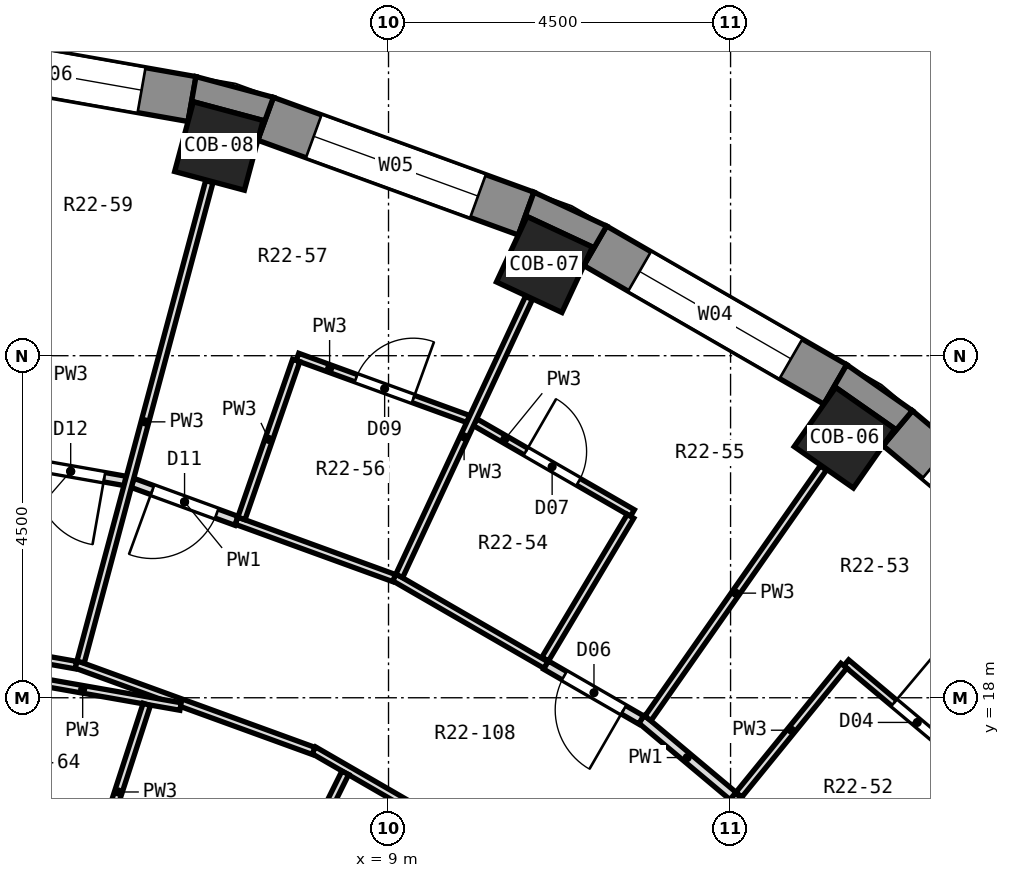
"""IFC4 building model, lengths in metres.
Left out: names, types, materials, properties, quantities, classifications, styles, units other than length and angle.
Written with IfcOpenShell. Run it as: python <this file> out.ifc"""

import sys

from ifc_helpers import new_model, si_unit, direction, frame, frame_2d, origin, origin_2d, place, context, subcontext, project, spatial, polyline, rectangle, outline, extrude, element, fill, save


model = new_model("IFC4")
c1 = context("Model", 3, precision=1e-05, world=origin(), true_north=direction((0.0, 1.0)))
c2 = subcontext(c1, "Body", "Model", "MODEL_VIEW")
j1 = project(units=[si_unit("LENGTHUNIT", "METRE"), si_unit("PLANEANGLEUNIT", "RADIAN")], contexts=[c1])
p1 = place(None, origin())
s1 = spatial("IfcSite", under=j1, at=p1, CompositionType="ELEMENT")
p2 = place(p1, origin())
s2 = spatial("IfcBuilding", under=s1, at=p2, CompositionType="ELEMENT")
p3 = place(p2, frame((0.0, 0.0, 141.4)))
s3 = spatial("IfcBuildingStorey", under=s2, at=p3, CompositionType="ELEMENT", Elevation=141.4)
for number, where, z_axis, x_axis in (
    (1, (14.999, 21.421, 0.0), (0.0, 0.0, 1.0), (0.574, 0.819, 0.0)),
    (2, (11.052, 23.7, 0.0), (0.0, 0.0, 1.0), (0.423, 0.906, 0.0)),
    (3, (6.768, 25.259, 0.0), (0.0, 0.0, 1.0), (0.259, 0.966, 0.0)),
):
    element("IfcColumn", number, at=place(p3, frame(where, z_axis=z_axis, x_axis=x_axis)), inside=s3, PredefinedType="COLUMN", context=c2, shape_type="SweptSolid", body=[
        extrude(rectangle(XDim=0.95, YDim=0.95, at=origin_2d()), origin(), (0.0, 0.0, 1.0), 3.3),
    ])
p4 = place(p3, frame((18.494, 19.202, 0.0), z_axis=(0.0, 0.0, 1.0), x_axis=(-0.766055462616, 0.642774476932, 0.0)))
e4 = element("IfcWall", 4, at=p4, inside=s3, PredefinedType="SOLIDWALL", context=c2, shape_type="SweptSolid", body=[
    extrude(rectangle(XDim=3.648, YDim=0.6, at=frame_2d((1.824, 0.0))), origin(), (0.0, 0.0, 1.0), 2.8),
])
p5 = place(p4, frame((0.674, 0.0, 0.9)))
e5 = element("IfcOpeningElement", 5, at=p5, cuts=e4, PredefinedType="OPENING", context=c2, shape_type="SweptSolid", body=[
    extrude(rectangle(XDim=2.3, YDim=1.8, at=frame_2d((1.15, 0.9))), frame((0.0, 0.312, 0.0), z_axis=(0.0, -1.0, 0.0), x_axis=(1.0, 0.0, 0.0)), (0.0, 0.0, 1.0), 0.624),
])
p6 = place(p3, frame((14.878, 22.122, 0.0), z_axis=(0.0, 0.0, 1.0), x_axis=(-0.866051847062, 0.499954196102, 0.0)))
e6 = element("IfcWall", 6, at=p6, inside=s3, PredefinedType="SOLIDWALL", context=c2, shape_type="SweptSolid", body=[
    extrude(rectangle(XDim=3.648, YDim=0.6, at=frame_2d((1.824, 0.0))), origin(), (0.0, 0.0, 1.0), 2.8),
])
p7 = place(p6, frame((0.674, 0.0, 0.9)))
e7 = element("IfcOpeningElement", 7, at=p7, cuts=e6, PredefinedType="OPENING", context=c2, shape_type="SweptSolid", body=[
    extrude(rectangle(XDim=2.3, YDim=1.8, at=frame_2d((1.15, 0.9))), frame((0.0, 0.312, 0.0), z_axis=(0.0, -1.0, 0.0), x_axis=(1.0, 0.0, 0.0)), (0.0, 0.0, 1.0), 0.624),
])
p8 = place(p3, frame((10.811, 24.369, 0.0), z_axis=(0.0, 0.0, 1.0), x_axis=(-0.939703505393, 0.341990236633, 0.0)))
e8 = element("IfcWall", 8, at=p8, inside=s3, PredefinedType="SOLIDWALL", context=c2, shape_type="SweptSolid", body=[
    extrude(rectangle(XDim=3.648, YDim=0.6, at=frame_2d((1.824, 0.0))), origin(), (0.0, 0.0, 1.0), 2.8),
])
p9 = place(p8, frame((0.674, 0.0, 0.9)))
e9 = element("IfcOpeningElement", 9, at=p9, cuts=e8, PredefinedType="OPENING", context=c2, shape_type="SweptSolid", body=[
    extrude(rectangle(XDim=2.3, YDim=1.8, at=frame_2d((1.15, 0.9))), frame((0.0, 0.312, 0.0), z_axis=(0.0, -1.0, 0.0), x_axis=(1.0, 0.0, 0.0)), (0.0, 0.0, 1.0), 0.624),
])
p10 = place(p3, frame((6.415, 25.876, 0.0), z_axis=(0.0, 0.0, 1.0), x_axis=(-0.984803764455, 0.173670796382, 0.0)))
e10 = element("IfcWall", 10, at=p10, inside=s3, PredefinedType="SOLIDWALL", context=c2, shape_type="SweptSolid", body=[
    extrude(rectangle(XDim=3.648, YDim=0.6, at=frame_2d((1.824, 0.0))), origin(), (0.0, 0.0, 1.0), 2.8),
])
p11 = place(p10, frame((0.674, 0.0, 0.9)))
e11 = element("IfcOpeningElement", 11, at=p11, cuts=e10, PredefinedType="OPENING", context=c2, shape_type="SweptSolid", body=[
    extrude(rectangle(XDim=2.3, YDim=1.8, at=frame_2d((1.15, 0.9))), frame((0.0, 0.312, 0.0), z_axis=(0.0, -1.0, 0.0), x_axis=(1.0, 0.0, 0.0)), (0.0, 0.0, 1.0), 0.624),
])
p12 = place(p3, origin())
e12 = element("IfcWall", 12, at=p12, inside=s3, PredefinedType="SOLIDWALL", context=c2, shape_type="SweptSolid", body=[
    extrude(outline(polyline([(15.028, 22.382), (14.728, 21.862), (14.882, 22.083), (15.661, 21.538), (15.506, 21.317), (15.892, 21.777), (15.028, 22.382)])), origin(), (0.0, 0.0, 1.0), 2.8),
])
p13 = place(p3, origin())
e13 = element("IfcWall", 13, at=p13, inside=s3, PredefinedType="SOLIDWALL", context=c2, shape_type="SweptSolid", body=[
    extrude(outline(polyline([(10.913, 24.651), (10.708, 24.087), (10.822, 24.331), (11.683, 23.93), (11.569, 23.686), (11.869, 24.206), (10.913, 24.651)])), origin(), (0.0, 0.0, 1.0), 2.8),
])
p14 = place(p3, origin())
e14 = element("IfcWall", 14, at=p14, inside=s3, PredefinedType="SOLIDWALL", context=c2, shape_type="SweptSolid", body=[
    extrude(outline(polyline([(7.486, 25.899), (6.467, 26.172), (6.363, 25.581), (6.432, 25.841), (7.35, 25.595), (7.28, 25.335), (7.486, 25.899)])), origin(), (0.0, 0.0, 1.0), 2.8),
])
p15 = place(p3, frame((13.532, 16.708, 0.0), z_axis=(0.0, 0.0, 1.0), x_axis=(0.766038513467, -0.642794676305, 0.0)))
e15 = element("IfcWall", 15, at=p15, inside=s3, PredefinedType="PARTITIONING", context=c2, shape_type="SweptSolid", body=[
    extrude(rectangle(XDim=2.205, YDim=0.1, at=frame_2d((1.103, 0.0))), origin(), (0.0, 0.0, 1.0), 2.8),
])
p16 = place(p3, frame((12.328, 17.718, 0.0), z_axis=(0.0, 0.0, 1.0), x_axis=(0.76611500949, -0.642703502585, 0.0)))
e16 = element("IfcWall", 16, at=p16, inside=s3, PredefinedType="PARTITIONING", context=c2, shape_type="SweptSolid", body=[
    extrude(rectangle(XDim=1.571, YDim=0.125, at=frame_2d((0.785, 0.0))), origin(), (0.0, 0.0, 1.0), 2.8),
])
p17 = place(p3, frame((15.022, 18.46, 0.0), z_axis=(0.0, 0.0, 1.0), x_axis=(0.765953139847, -0.642896404997, 0.0)))
e17 = element("IfcWall", 17, at=p17, inside=s3, PredefinedType="PARTITIONING", context=c2, shape_type="SweptSolid", body=[
    extrude(rectangle(XDim=2.44, YDim=0.1, at=frame_2d((1.22, 0.0))), origin(), (0.0, 0.0, 1.0), 2.8),
])
p18 = place(p17, frame((0.82, 0.0, 0.0)))
e18 = element("IfcOpeningElement", 18, at=p18, cuts=e17, PredefinedType="OPENING", context=c2, shape_type="SweptSolid", body=[
    extrude(rectangle(XDim=0.8, YDim=2.1, at=frame_2d((0.4, 1.05))), frame((0.0, 0.062, 0.0), z_axis=(0.0, -1.0, 0.0), x_axis=(1.0, 0.0, 0.0)), (0.0, 0.0, 1.0), 0.124),
])
p19 = place(p3, frame((8.016, 17.309, 0.0), z_axis=(0.0, 0.0, 1.0), x_axis=(0.865920199123, -0.500182175564, 0.0)))
e19 = element("IfcWall", 19, at=p19, inside=s3, PredefinedType="PARTITIONING", context=c2, shape_type="SweptSolid", body=[
    extrude(rectangle(XDim=3.325, YDim=0.1, at=frame_2d((1.663, 0.0))), origin(), (0.0, 0.0, 1.0), 2.8),
])
p20 = place(p3, frame((9.076, 19.583, 0.0), z_axis=(0.0, 0.0, 1.0), x_axis=(0.865841628869, -0.500318172484, 0.0)))
e20 = element("IfcWall", 20, at=p20, inside=s3, PredefinedType="PARTITIONING", context=c2, shape_type="SweptSolid", body=[
    extrude(rectangle(XDim=2.306, YDim=0.1, at=frame_2d((1.153, 0.0))), origin(), (0.0, 0.0, 1.0), 2.8),
])
p21 = place(p3, frame((11.072, 18.43, 0.0), z_axis=(0.0, 0.0, 1.0), x_axis=(0.866112382925, -0.499849317439, 0.0)))
e21 = element("IfcWall", 21, at=p21, inside=s3, PredefinedType="PARTITIONING", context=c2, shape_type="SweptSolid", body=[
    extrude(rectangle(XDim=1.444, YDim=0.125, at=frame_2d((0.722, 0.0))), origin(), (0.0, 0.0, 1.0), 2.8),
])
p22 = place(p21, frame((0.278, 0.0, 0.0)))
e22 = element("IfcOpeningElement", 22, at=p22, cuts=e21, PredefinedType="OPENING", context=c2, shape_type="SweptSolid", body=[
    extrude(rectangle(XDim=0.9, YDim=2.1, at=frame_2d((0.45, 1.05))), frame((0.0, 0.074, 0.0), z_axis=(0.0, -1.0, 0.0), x_axis=(1.0, 0.0, 0.0)), (0.0, 0.0, 1.0), 0.149),
])
p23 = place(p3, frame((10.139, 21.625, 0.0), z_axis=(0.0, 0.0, 1.0), x_axis=(0.865989934965, -0.500061428766, 0.0)))
e23 = element("IfcWall", 23, at=p23, inside=s3, PredefinedType="PARTITIONING", context=c2, shape_type="SweptSolid", body=[
    extrude(rectangle(XDim=2.39, YDim=0.1, at=frame_2d((1.195, 0.0))), origin(), (0.0, 0.0, 1.0), 2.8),
])
p24 = place(p23, frame((0.77, 0.0, 0.0)))
e24 = element("IfcOpeningElement", 24, at=p24, cuts=e23, PredefinedType="OPENING", context=c2, shape_type="SweptSolid", body=[
    extrude(rectangle(XDim=0.8, YDim=2.1, at=frame_2d((0.4, 1.05))), frame((0.0, 0.062, 0.0), z_axis=(0.0, -1.0, 0.0), x_axis=(1.0, 0.0, 0.0)), (0.0, 0.0, 1.0), 0.124),
])
p25 = place(p3, frame((5.633, 20.827, 0.0), z_axis=(0.0, 0.0, 1.0), x_axis=(0.939292989356, -0.343116132159, 0.0)))
e25 = element("IfcWall", 25, at=p25, inside=s3, PredefinedType="PARTITIONING", context=c2, shape_type="SweptSolid", body=[
    extrude(rectangle(XDim=1.456, YDim=0.125, at=frame_2d((0.728, 0.0))), origin(), (0.0, 0.0, 1.0), 2.8),
])
p26 = place(p25, frame((0.278, 0.0, 0.0)))
e26 = element("IfcOpeningElement", 26, at=p26, cuts=e25, PredefinedType="OPENING", context=c2, shape_type="SweptSolid", body=[
    extrude(rectangle(XDim=0.9, YDim=2.1, at=frame_2d((0.45, 1.05))), frame((0.0, 0.074, 0.0), z_axis=(0.0, -1.0, 0.0), x_axis=(1.0, 0.0, 0.0)), (0.0, 0.0, 1.0), 0.149),
])
p27 = place(p3, frame((4.888, 18.438, 0.0), z_axis=(0.0, 0.0, 1.0), x_axis=(0.939679760884, -0.342055473549, 0.0)))
e27 = element("IfcWall", 27, at=p27, inside=s3, PredefinedType="PARTITIONING", context=c2, shape_type="SweptSolid", body=[
    extrude(rectangle(XDim=3.325, YDim=0.1, at=frame_2d((1.663, 0.0))), origin(), (0.0, 0.0, 1.0), 2.8),
])
p28 = place(p3, frame((7.001, 20.329, 0.0), z_axis=(0.0, 0.0, 1.0), x_axis=(0.939728749343, -0.341920864613, 0.0)))
e28 = element("IfcWall", 28, at=p28, inside=s3, PredefinedType="PARTITIONING", context=c2, shape_type="SweptSolid", body=[
    extrude(rectangle(XDim=2.205, YDim=0.1, at=frame_2d((1.103, 0.0))), origin(), (0.0, 0.0, 1.0), 2.8),
])
p29 = place(p3, frame((7.802, 22.485, 0.0), z_axis=(0.0, 0.0, 1.0), x_axis=(0.939659214987, -0.342111911063, 0.0)))
e29 = element("IfcWall", 29, at=p29, inside=s3, PredefinedType="PARTITIONING", context=c2, shape_type="SweptSolid", body=[
    extrude(rectangle(XDim=2.391, YDim=0.1, at=frame_2d((1.196, 0.0))), origin(), (0.0, 0.0, 1.0), 2.8),
])
p30 = place(p29, frame((0.821, 0.0, 0.0)))
e30 = element("IfcOpeningElement", 30, at=p30, cuts=e29, PredefinedType="OPENING", context=c2, shape_type="SweptSolid", body=[
    extrude(rectangle(XDim=0.8, YDim=2.1, at=frame_2d((0.4, 1.05))), frame((0.0, 0.062, 0.0), z_axis=(0.0, -1.0, 0.0), x_axis=(1.0, 0.0, 0.0)), (0.0, 0.0, 1.0), 0.124),
])
p31 = place(p3, frame((3.688, 18.338, 0.0), z_axis=(0.0, 0.0, 1.0), x_axis=(0.984859586639, -0.173353957572, 0.0)))
e31 = element("IfcWall", 31, at=p31, inside=s3, PredefinedType="PARTITIONING", context=c2, shape_type="SweptSolid", body=[
    extrude(rectangle(XDim=2.615, YDim=0.1, at=frame_2d((1.308, 0.0))), origin(), (0.0, 0.0, 1.0), 2.8),
])
p32 = place(p3, frame((1.612, 19.008, 0.0), z_axis=(0.0, 0.0, 1.0), x_axis=(0.984770991222, -0.173856535243, 0.0)))
e32 = element("IfcWall", 32, at=p32, inside=s3, PredefinedType="PARTITIONING", context=c2, shape_type="SweptSolid", body=[
    extrude(rectangle(XDim=3.325, YDim=0.1, at=frame_2d((1.663, 0.0))), origin(), (0.0, 0.0, 1.0), 2.8),
])
p33 = place(p32, frame((1.163, 0.0, 0.0)))
e33 = element("IfcOpeningElement", 33, at=p33, cuts=e32, PredefinedType="OPENING", context=c2, shape_type="SweptSolid", body=[
    extrude(rectangle(XDim=0.9, YDim=2.1, at=frame_2d((0.45, 1.05))), frame((0.0, 0.062, 0.0), z_axis=(0.0, -1.0, 0.0), x_axis=(1.0, 0.0, 0.0)), (0.0, 0.0, 1.0), 0.124),
])
p34 = place(p3, frame((4.101, 21.105, 0.0), z_axis=(0.0, 0.0, 1.0), x_axis=(0.984862774054, -0.173335848233, 0.0)))
e34 = element("IfcWall", 34, at=p34, inside=s3, PredefinedType="PARTITIONING", context=c2, shape_type="SweptSolid", body=[
    extrude(rectangle(XDim=1.456, YDim=0.125, at=frame_2d((0.728, 0.0))), origin(), (0.0, 0.0, 1.0), 2.8),
])
p35 = place(p34, frame((0.278, 0.0, 0.0)))
e35 = element("IfcOpeningElement", 35, at=p35, cuts=e34, PredefinedType="OPENING", context=c2, shape_type="SweptSolid", body=[
    extrude(rectangle(XDim=0.9, YDim=2.1, at=frame_2d((0.45, 1.05))), frame((0.0, 0.074, 0.0), z_axis=(0.0, -1.0, 0.0), x_axis=(1.0, 0.0, 0.0)), (0.0, 0.0, 1.0), 0.149),
])
p36 = place(p3, frame((13.52, 13.52, 0.0), z_axis=(0.0, 0.0, 1.0), x_axis=(0.707106781187, 0.707106781187, 0.0)))
e36 = element("IfcWall", 36, at=p36, inside=s3, PredefinedType="PARTITIONING", context=c2, shape_type="SweptSolid", body=[
    extrude(rectangle(XDim=4.717, YDim=0.1, at=frame_2d((2.358, 0.0))), origin(), (0.0, 0.0, 1.0), 2.8),
])
p37 = place(p3, frame((13.609, 16.724, 0.0), z_axis=(0.0, 0.0, 1.0), x_axis=(0.631272959342, 0.77556073315, 0.0)))
e37 = element("IfcWall", 37, at=p37, inside=s3, PredefinedType="PARTITIONING", context=c2, shape_type="SweptSolid", body=[
    extrude(rectangle(XDim=2.188, YDim=0.1, at=frame_2d((1.094, 0.0))), origin(), (0.0, 0.0, 1.0), 2.8),
])
p38 = place(p3, frame((12.413, 17.728, 0.0), z_axis=(0.0, 0.0, 1.0), x_axis=(0.573641530368, 0.819106461113, 0.0)))
e38 = element("IfcWall", 38, at=p38, inside=s3, PredefinedType="PARTITIONING", context=c2, shape_type="SweptSolid", body=[
    extrude(rectangle(XDim=4.023, YDim=0.1, at=frame_2d((2.012, 0.0))), origin(), (0.0, 0.0, 1.0), 2.8),
])
p39 = place(p3, frame((11.061, 18.509, 0.0), z_axis=(0.0, 0.0, 1.0), x_axis=(0.512903306279, 0.85844638645, 0.0)))
e39 = element("IfcWall", 39, at=p39, inside=s3, PredefinedType="PARTITIONING", context=c2, shape_type="SweptSolid", body=[
    extrude(rectangle(XDim=2.188, YDim=0.1, at=frame_2d((1.094, 0.0))), origin(), (0.0, 0.0, 1.0), 2.8),
])
p40 = place(p3, frame((5.189, 10.47, 0.0), z_axis=(0.0, 0.0, 1.0), x_axis=(0.444040739055, 0.896006597107, 0.0)))
e40 = element("IfcWall", 40, at=p40, inside=s3, PredefinedType="PARTITIONING", context=c2, shape_type="SweptSolid", body=[
    extrude(rectangle(XDim=7.301, YDim=0.1, at=frame_2d((3.65, 0.0))), origin(), (0.0, 0.0, 1.0), 2.8),
])
p41 = place(p40, frame((3.193, 0.0, 0.0)))
e41 = element("IfcOpeningElement", 41, at=p41, cuts=e40, PredefinedType="OPENING", context=c2, shape_type="SweptSolid", body=[
    extrude(rectangle(XDim=0.9, YDim=2.1, at=frame_2d((0.45, 1.05))), frame((0.0, 0.062, 0.0), z_axis=(0.0, -1.0, 0.0), x_axis=(1.0, 0.0, 0.0)), (0.0, 0.0, 1.0), 0.124),
])
p42 = place(p3, frame((9.141, 19.603, 0.0), z_axis=(0.0, 0.0, 1.0), x_axis=(0.42279934512, 0.906223324444, 0.0)))
e42 = element("IfcWall", 42, at=p42, inside=s3, PredefinedType="PARTITIONING", context=c2, shape_type="SweptSolid", body=[
    extrude(rectangle(XDim=4.035, YDim=0.1, at=frame_2d((2.018, 0.0))), origin(), (0.0, 0.0, 1.0), 2.8),
])
p43 = place(p3, frame((7.064, 20.359, 0.0), z_axis=(0.0, 0.0, 1.0), x_axis=(0.327788872324, 0.944751001683, 0.0)))
e43 = element("IfcWall", 43, at=p43, inside=s3, PredefinedType="PARTITIONING", context=c2, shape_type="SweptSolid", body=[
    extrude(rectangle(XDim=2.2, YDim=0.1, at=frame_2d((1.1, 0.0))), origin(), (0.0, 0.0, 1.0), 2.8),
])
p44 = place(p3, frame((5.072, 15.609, 0.0), z_axis=(0.0, 0.0, 1.0), x_axis=(0.30874872516, 0.95114364042, 0.0)))
e44 = element("IfcWall", 44, at=p44, inside=s3, PredefinedType="PARTITIONING", context=c2, shape_type="SweptSolid", body=[
    extrude(rectangle(XDim=2.422, YDim=0.1, at=frame_2d((1.211, 0.0))), origin(), (0.0, 0.0, 1.0), 2.8),
])
p45 = place(p3, frame((4.949, 18.469, 0.0), z_axis=(0.0, 0.0, 1.0), x_axis=(0.258793270627, 0.96593273217, 0.0)))
e45 = element("IfcWall", 45, at=p45, inside=s3, PredefinedType="PARTITIONING", context=c2, shape_type="SweptSolid", body=[
    extrude(rectangle(XDim=6.544, YDim=0.1, at=frame_2d((3.272, 0.0))), origin(), (0.0, 0.0, 1.0), 2.8),
])
p46 = place(p5, origin())
e46 = element("IfcWindow", 46, at=p46, inside=s3, PartitioningType="SINGLE_PANEL", PredefinedType="WINDOW", context=c2, shape_type="SweptSolid", body=[
    extrude(rectangle(XDim=2.3, YDim=1.8, at=frame_2d((1.15, 0.9))), frame((0.0, 0.18, 0.0), z_axis=(0.0, -1.0, 0.0), x_axis=(1.0, 0.0, 0.0)), (0.0, 0.0, 1.0), 0.06),
])
fill(e5, e46)
p47 = place(p7, origin())
e47 = element("IfcWindow", 47, at=p47, inside=s3, PartitioningType="SINGLE_PANEL", PredefinedType="WINDOW", context=c2, shape_type="SweptSolid", body=[
    extrude(rectangle(XDim=2.3, YDim=1.8, at=frame_2d((1.15, 0.9))), frame((0.0, 0.18, 0.0), z_axis=(0.0, -1.0, 0.0), x_axis=(1.0, 0.0, 0.0)), (0.0, 0.0, 1.0), 0.06),
])
fill(e7, e47)
p48 = place(p9, origin())
e48 = element("IfcWindow", 48, at=p48, inside=s3, PartitioningType="SINGLE_PANEL", PredefinedType="WINDOW", context=c2, shape_type="SweptSolid", body=[
    extrude(rectangle(XDim=2.3, YDim=1.8, at=frame_2d((1.15, 0.9))), frame((0.0, 0.18, 0.0), z_axis=(0.0, -1.0, 0.0), x_axis=(1.0, 0.0, 0.0)), (0.0, 0.0, 1.0), 0.06),
])
fill(e9, e48)
p49 = place(p11, origin())
e49 = element("IfcWindow", 49, at=p49, inside=s3, PartitioningType="SINGLE_PANEL", PredefinedType="WINDOW", context=c2, shape_type="SweptSolid", body=[
    extrude(rectangle(XDim=2.3, YDim=1.8, at=frame_2d((1.15, 0.9))), frame((0.0, 0.18, 0.0), z_axis=(0.0, -1.0, 0.0), x_axis=(1.0, 0.0, 0.0)), (0.0, 0.0, 1.0), 0.06),
])
fill(e11, e49)
p50 = place(p18, origin())
e50 = element("IfcDoor", 50, at=p50, inside=s3, OperationType="SINGLE_SWING_LEFT", PredefinedType="DOOR", context=c2, shape_type="SweptSolid", body=[
    extrude(rectangle(XDim=0.8, YDim=2.1, at=frame_2d((0.4, 1.05))), frame((0.0, 0.025, 0.0), z_axis=(0.0, -1.0, 0.0), x_axis=(1.0, 0.0, 0.0)), (0.0, 0.0, 1.0), 0.05),
])
fill(e18, e50)
p51 = place(p22, frame((0.9, 0.0, 0.0), z_axis=(0.0, 0.0, 1.0), x_axis=(-1.0, 0.0, 0.0)))
e51 = element("IfcDoor", 51, at=p51, inside=s3, OperationType="SINGLE_SWING_LEFT", PredefinedType="DOOR", context=c2, shape_type="SweptSolid", body=[
    extrude(rectangle(XDim=0.9, YDim=2.1, at=frame_2d((0.45, 1.05))), frame((0.0, 0.025, 0.0), z_axis=(0.0, -1.0, 0.0), x_axis=(1.0, 0.0, 0.0)), (0.0, 0.0, 1.0), 0.05),
])
fill(e22, e51)
p52 = place(p24, origin())
e52 = element("IfcDoor", 52, at=p52, inside=s3, OperationType="SINGLE_SWING_LEFT", PredefinedType="DOOR", context=c2, shape_type="SweptSolid", body=[
    extrude(rectangle(XDim=0.8, YDim=2.1, at=frame_2d((0.4, 1.05))), frame((0.0, 0.025, 0.0), z_axis=(0.0, -1.0, 0.0), x_axis=(1.0, 0.0, 0.0)), (0.0, 0.0, 1.0), 0.05),
])
fill(e24, e52)
p53 = place(p30, origin())
e53 = element("IfcDoor", 53, at=p53, inside=s3, OperationType="SINGLE_SWING_RIGHT", PredefinedType="DOOR", context=c2, shape_type="SweptSolid", body=[
    extrude(rectangle(XDim=0.8, YDim=2.1, at=frame_2d((0.4, 1.05))), frame((0.0, 0.025, 0.0), z_axis=(0.0, -1.0, 0.0), x_axis=(1.0, 0.0, 0.0)), (0.0, 0.0, 1.0), 0.05),
])
fill(e30, e53)
p54 = place(p26, frame((0.9, 0.0, 0.0), z_axis=(0.0, 0.0, 1.0), x_axis=(-1.0, 0.0, 0.0)))
e54 = element("IfcDoor", 54, at=p54, inside=s3, OperationType="SINGLE_SWING_RIGHT", PredefinedType="DOOR", context=c2, shape_type="SweptSolid", body=[
    extrude(rectangle(XDim=0.9, YDim=2.1, at=frame_2d((0.45, 1.05))), frame((0.0, 0.025, 0.0), z_axis=(0.0, -1.0, 0.0), x_axis=(1.0, 0.0, 0.0)), (0.0, 0.0, 1.0), 0.05),
])
fill(e26, e54)
p55 = place(p35, frame((0.9, 0.0, 0.0), z_axis=(0.0, 0.0, 1.0), x_axis=(-1.0, 0.0, 0.0)))
e55 = element("IfcDoor", 55, at=p55, inside=s3, OperationType="SINGLE_SWING_LEFT", PredefinedType="DOOR", context=c2, shape_type="SweptSolid", body=[
    extrude(rectangle(XDim=0.9, YDim=2.1, at=frame_2d((0.45, 1.05))), frame((0.0, 0.025, 0.0), z_axis=(0.0, -1.0, 0.0), x_axis=(1.0, 0.0, 0.0)), (0.0, 0.0, 1.0), 0.05),
])
fill(e35, e55)
save(model, sys.argv[1])
